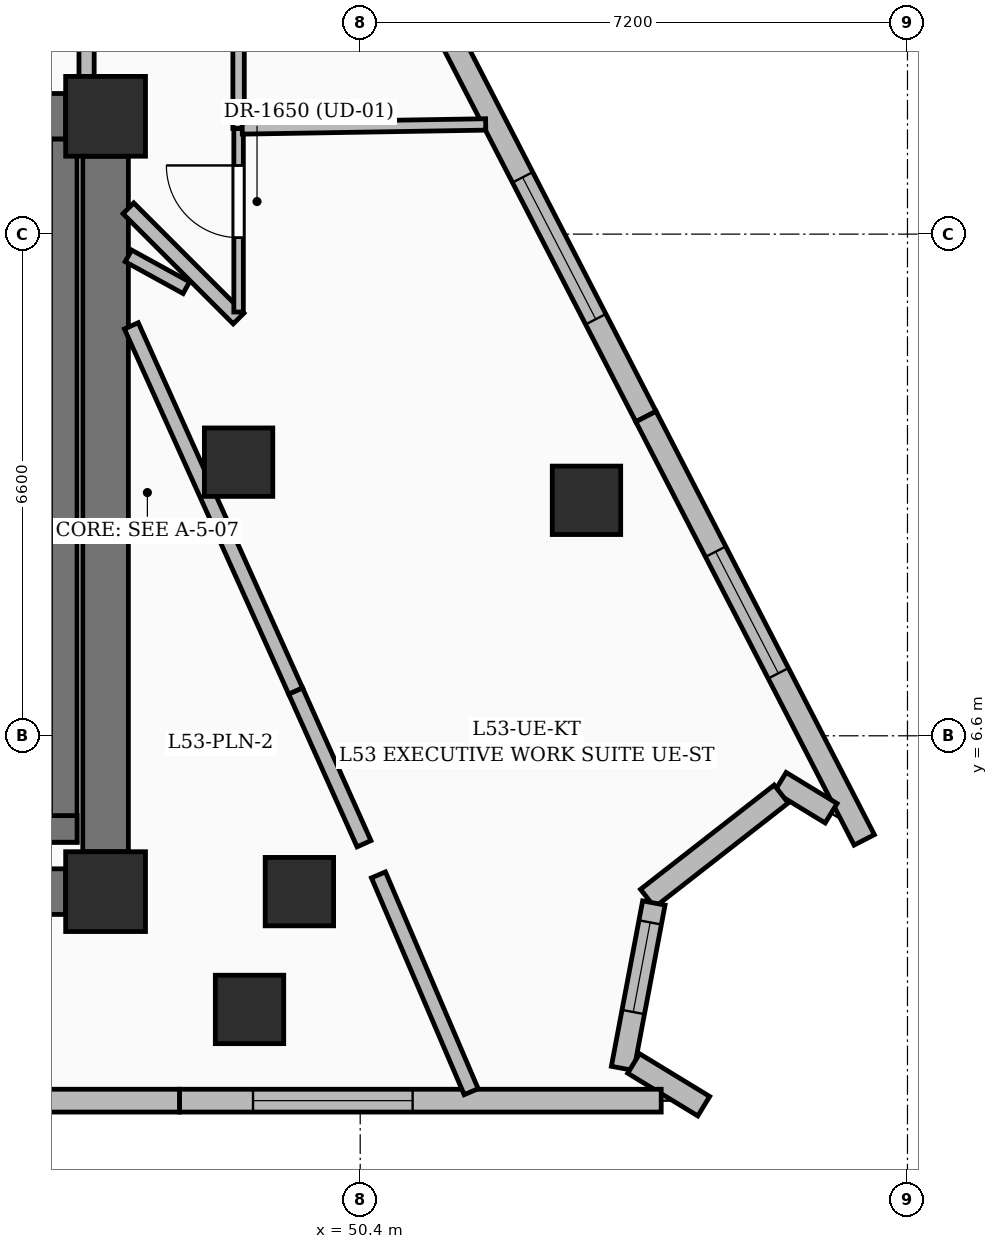
"""IFC4 building model, lengths in metres.
Left out: names, types, materials, properties, quantities, classifications, styles, units other than length and angle.
Written with IfcOpenShell. Run it as: python <this file> out.ifc"""

import sys

from ifc_helpers import new_model, si_unit, direction, frame, frame_2d, origin, origin_2d, place, context, subcontext, project, spatial, rectangle, extrude, element, fill, save


model = new_model("IFC4")
c1 = context("Model", 3, precision=1e-05, world=origin(), true_north=direction((0.0, 1.0)))
c2 = subcontext(c1, "Body", "Model", "MODEL_VIEW")
j1 = project(units=[si_unit("LENGTHUNIT", "METRE"), si_unit("PLANEANGLEUNIT", "RADIAN")], contexts=[c1])
p1 = place(None, origin())
s1 = spatial("IfcSite", under=j1, at=p1, CompositionType="ELEMENT")
p2 = place(p1, origin())
s2 = spatial("IfcBuilding", under=s1, at=p2, CompositionType="ELEMENT")
p3 = place(p2, frame((0.0, 0.0, 207.0)))
s3 = spatial("IfcBuildingStorey", under=s2, at=p3, CompositionType="ELEMENT", Elevation=207.0)
for number, where, z_axis, x_axis in (
    (1, (47.05, 4.55, 0.0), (0.0, 0.0, 1.0), (1.0, 0.0, 0.0)),
    (2, (47.05, 14.75, 0.0), (0.0, 0.0, 1.0), (1.0, 0.0, 0.0)),
):
    element("IfcColumn", number, at=place(p3, frame(where, z_axis=z_axis, x_axis=x_axis)), inside=s3, PredefinedType="COLUMN", context=c2, shape_type="SweptSolid", body=[
        extrude(rectangle(XDim=1.05, YDim=1.05, at=origin_2d()), origin(), (0.0, 0.0, 1.0), 3.75),
    ])
for number, where, z_axis, x_axis in (
    (3, (49.6, 4.55, 0.0), (0.0, 0.0, 1.0), (1.0, 0.0, 0.0)),
    (4, (48.8, 10.2, 0.0), (0.0, 0.0, 1.0), (1.0, 0.0, 0.0)),
):
    element("IfcColumn", number, at=place(p3, frame(where, z_axis=z_axis, x_axis=x_axis)), inside=s3, PredefinedType="COLUMN", context=c2, shape_type="SweptSolid", body=[
        extrude(rectangle(XDim=0.9, YDim=0.9, at=origin_2d()), origin(), (0.0, 0.0, 1.0), 3.75),
    ])
p4 = place(p3, frame((35.675, 4.55, 0.0), z_axis=(0.0, 0.0, 1.0), x_axis=(1.0, 0.0, 0.0)))
e5 = element("IfcWall", 5, at=p4, inside=s3, PredefinedType="SHEAR", context=c2, shape_type="SweptSolid", body=[
    extrude(rectangle(XDim=10.85, YDim=0.6, at=frame_2d((5.425, 0.0))), origin(), (0.0, 0.0, 1.0), 3.75),
])
p5 = place(p3, frame((35.675, 14.75, 0.0), z_axis=(0.0, 0.0, 1.0), x_axis=(1.0, 0.0, 0.0)))
e6 = element("IfcWall", 6, at=p5, inside=s3, PredefinedType="SHEAR", context=c2, shape_type="SweptSolid", body=[
    extrude(rectangle(XDim=10.85, YDim=0.6, at=frame_2d((5.425, 0.0))), origin(), (0.0, 0.0, 1.0), 3.75),
])
p6 = place(p5, frame((1.1, 0.0, 0.0)))
e7 = element("IfcOpeningElement", 7, at=p6, cuts=e6, PredefinedType="OPENING", context=c2, shape_type="SweptSolid", body=[
    extrude(rectangle(XDim=1.05, YDim=2.15, at=frame_2d((0.525, 1.075))), frame((0.0, 0.31, 0.0), z_axis=(0.0, -1.0, 0.0), x_axis=(1.0, 0.0, 0.0)), (0.0, 0.0, 1.0), 0.62),
])
p7 = place(p5, frame((8.7, 0.0, 0.0)))
e8 = element("IfcOpeningElement", 8, at=p7, cuts=e6, PredefinedType="OPENING", context=c2, shape_type="SweptSolid", body=[
    extrude(rectangle(XDim=1.05, YDim=2.15, at=frame_2d((0.525, 1.075))), frame((0.0, 0.31, 0.0), z_axis=(0.0, -1.0, 0.0), x_axis=(1.0, 0.0, 0.0)), (0.0, 0.0, 1.0), 0.62),
])
p8 = place(p5, frame((3.825, 0.0, 0.0)))
e9 = element("IfcOpeningElement", 9, at=p8, cuts=e6, PredefinedType="OPENING", context=c2, shape_type="SweptSolid", body=[
    extrude(rectangle(XDim=1.2, YDim=2.2, at=frame_2d((0.6, 1.1))), frame((0.0, 0.31, 0.0), z_axis=(0.0, -1.0, 0.0), x_axis=(1.0, 0.0, 0.0)), (0.0, 0.0, 1.0), 0.62),
])
p9 = place(p5, frame((5.825, 0.0, 0.0)))
e10 = element("IfcOpeningElement", 10, at=p9, cuts=e6, PredefinedType="OPENING", context=c2, shape_type="SweptSolid", body=[
    extrude(rectangle(XDim=1.2, YDim=2.2, at=frame_2d((0.6, 1.1))), frame((0.0, 0.31, 0.0), z_axis=(0.0, -1.0, 0.0), x_axis=(1.0, 0.0, 0.0)), (0.0, 0.0, 1.0), 0.62),
])
p10 = place(p3, frame((47.05, 5.075, 0.0), z_axis=(0.0, 0.0, 1.0), x_axis=(0.0, 1.0, 0.0)))
e11 = element("IfcWall", 11, at=p10, inside=s3, PredefinedType="SHEAR", context=c2, shape_type="SweptSolid", body=[
    extrude(rectangle(XDim=9.15, YDim=0.6, at=frame_2d((4.575, 0.0))), origin(), (0.0, 0.0, 1.0), 3.75),
])
p11 = place(p3, frame((46.5, 5.2, 0.0), z_axis=(0.0, 0.0, 1.0), x_axis=(0.0, 1.0, 0.0)))
e12 = element("IfcWall", 12, at=p11, inside=s3, PredefinedType="SOLIDWALL", context=c2, shape_type="SweptSolid", body=[
    extrude(rectangle(XDim=9.25, YDim=0.35, at=frame_2d((4.625, 0.0))), origin(), (0.0, 0.0, 1.0), 3.75),
])
p12 = place(p3, frame((43.125, 5.375, 0.0), z_axis=(0.0, 0.0, 1.0), x_axis=(1.0, 0.0, 0.0)))
e13 = element("IfcWall", 13, at=p12, inside=s3, PredefinedType="SOLIDWALL", context=c2, shape_type="SweptSolid", body=[
    extrude(rectangle(XDim=3.55, YDim=0.35, at=frame_2d((1.775, 0.0))), origin(), (0.0, 0.0, 1.0), 3.75),
])
for number, where, z_axis, x_axis in (
    (14, (48.944, 3.0, 0.0), (0.0, 0.0, 1.0), (1.0, 0.0, 0.0)),
    (15, (53.377, 9.698, 0.0), (0.0, 0.0, 1.0), (1.0, 0.0, 0.0)),
):
    element("IfcColumn", number, at=place(p3, frame(where, z_axis=z_axis, x_axis=x_axis)), inside=s3, PredefinedType="COLUMN", context=c2, shape_type="SweptSolid", body=[
        extrude(rectangle(XDim=0.9, YDim=0.9, at=origin_2d()), origin(), (0.0, 0.0, 1.0), 3.75),
    ])
p13 = place(p3, frame((51.288, 16.369, 0.0), z_axis=(0.0, 0.0, 1.0), x_axis=(0.458306446078, -0.88879424024, 0.0)))
e16 = element("IfcWall", 16, at=p13, inside=s3, PredefinedType="SOLIDWALL", context=c2, shape_type="SweptSolid", body=[
    extrude(rectangle(XDim=6.266, YDim=0.3, at=frame_2d((3.133, 0.0))), origin(), (0.0, 0.0, 1.0), 3.5),
])
p14 = place(p13, frame((2.725, 0.0, 0.55)))
e17 = element("IfcOpeningElement", 17, at=p14, cuts=e16, PredefinedType="OPENING", context=c2, shape_type="SweptSolid", body=[
    extrude(rectangle(XDim=2.1, YDim=2.4, at=frame_2d((1.05, 1.2))), frame((0.0, 0.16, 0.0), z_axis=(0.0, -1.0, 0.0), x_axis=(1.0, 0.0, 0.0)), (0.0, 0.0, 1.0), 0.32),
])
p15 = place(p3, frame((54.159, 10.8, 0.0), z_axis=(0.0, 0.0, 1.0), x_axis=(0.458322317218, -0.888786056113, 0.0)))
e18 = element("IfcWall", 18, at=p15, inside=s3, PredefinedType="SOLIDWALL", context=c2, shape_type="SweptSolid", body=[
    extrude(rectangle(XDim=6.266, YDim=0.3, at=frame_2d((3.133, 0.0))), origin(), (0.0, 0.0, 1.0), 3.5),
])
p16 = place(p15, frame((2.0, 0.0, 0.6)))
e19 = element("IfcOpeningElement", 19, at=p16, cuts=e18, PredefinedType="OPENING", context=c2, shape_type="SweptSolid", body=[
    extrude(rectangle(XDim=1.8, YDim=2.1, at=frame_2d((0.9, 1.05))), frame((0.0, 0.16, 0.0), z_axis=(0.0, -1.0, 0.0), x_axis=(1.0, 0.0, 0.0)), (0.0, 0.0, 1.0), 0.32),
])
p17 = place(p3, frame((56.595, 5.581, 0.0), z_axis=(0.0, 0.0, 1.0), x_axis=(-0.853681479387, 0.520795479772, 0.0)))
e20 = element("IfcWall", 20, at=p17, inside=s3, PredefinedType="SOLIDWALL", context=c2, shape_type="SweptSolid", body=[
    extrude(rectangle(XDim=0.785, YDim=0.3, at=frame_2d((0.392, 0.0))), origin(), (0.0, 0.0, 1.0), 3.5),
])
p18 = place(p3, frame((55.939, 5.834, 0.0), z_axis=(0.0, 0.0, 1.0), x_axis=(-0.788331324268, -0.615250943256, 0.0)))
e21 = element("IfcWall", 21, at=p18, inside=s3, PredefinedType="SOLIDWALL", context=c2, shape_type="SweptSolid", body=[
    extrude(rectangle(XDim=2.23, YDim=0.3, at=frame_2d((1.115, 0.0))), origin(), (0.0, 0.0, 1.0), 3.5),
])
p19 = place(p3, frame((54.263, 4.401, 0.0), z_axis=(0.0, 0.0, 1.0), x_axis=(-0.185632792315, -0.982619186876, 0.0)))
e22 = element("IfcWall", 22, at=p19, inside=s3, PredefinedType="SOLIDWALL", context=c2, shape_type="SweptSolid", body=[
    extrude(rectangle(XDim=2.215, YDim=0.3, at=frame_2d((1.107, 0.0))), origin(), (0.0, 0.0, 1.0), 3.5),
])
p20 = place(p19, frame((0.26, 0.0, 0.8)))
e23 = element("IfcOpeningElement", 23, at=p20, cuts=e22, PredefinedType="OPENING", context=c2, shape_type="SweptSolid", body=[
    extrude(rectangle(XDim=1.2, YDim=1.8, at=frame_2d((0.6, 0.9))), frame((0.0, 0.16, 0.0), z_axis=(0.0, -1.0, 0.0), x_axis=(1.0, 0.0, 0.0)), (0.0, 0.0, 1.0), 0.32),
])
p21 = place(p3, frame((53.998, 2.289, 0.0), z_axis=(0.0, 0.0, 1.0), x_axis=(0.853840299064, -0.520535055203, 0.0)))
e24 = element("IfcWall", 24, at=p21, inside=s3, PredefinedType="SOLIDWALL", context=c2, shape_type="SweptSolid", body=[
    extrude(rectangle(XDim=1.08, YDim=0.3, at=frame_2d((0.54, 0.0))), origin(), (0.0, 0.0, 1.0), 3.5),
])
p22 = place(p3, frame((54.36, 1.8, 0.0), z_axis=(0.0, 0.0, 1.0), x_axis=(-1.0, 0.0, 0.0)))
e25 = element("IfcWall", 25, at=p22, inside=s3, PredefinedType="SOLIDWALL", context=c2, shape_type="SweptSolid", body=[
    extrude(rectangle(XDim=6.338, YDim=0.3, at=frame_2d((3.169, 0.0))), origin(), (0.0, 0.0, 1.0), 3.5),
])
p23 = place(p22, frame((3.27, 0.0, 0.55)))
e26 = element("IfcOpeningElement", 26, at=p23, cuts=e25, PredefinedType="OPENING", context=c2, shape_type="SweptSolid", body=[
    extrude(rectangle(XDim=2.1, YDim=2.4, at=frame_2d((1.05, 1.2))), frame((0.0, 0.16, 0.0), z_axis=(0.0, -1.0, 0.0), x_axis=(1.0, 0.0, 0.0)), (0.0, 0.0, 1.0), 0.32),
])
p24 = place(p3, frame((48.022, 1.8, 0.0), z_axis=(0.0, 0.0, 1.0), x_axis=(-1.0, 0.0, 0.0)))
e27 = element("IfcWall", 27, at=p24, inside=s3, PredefinedType="SOLIDWALL", context=c2, shape_type="SweptSolid", body=[
    extrude(rectangle(XDim=6.918, YDim=0.3, at=frame_2d((3.459, 0.0))), origin(), (0.0, 0.0, 1.0), 3.5),
])
p25 = place(p24, frame((2.875, 0.0, 0.6)))
e28 = element("IfcOpeningElement", 28, at=p25, cuts=e27, PredefinedType="OPENING", context=c2, shape_type="SweptSolid", body=[
    extrude(rectangle(XDim=1.8, YDim=2.1, at=frame_2d((0.9, 1.05))), frame((0.0, 0.16, 0.0), z_axis=(0.0, -1.0, 0.0), x_axis=(1.0, 0.0, 0.0)), (0.0, 0.0, 1.0), 0.32),
])
p26 = place(p3, frame((46.8, 15.05, 0.0), z_axis=(0.0, 0.0, 1.0), x_axis=(0.0, 1.0, 0.0)))
e29 = element("IfcWall", 29, at=p26, inside=s3, PredefinedType="PARTITIONING", context=c2, shape_type="SweptSolid", body=[
    extrude(rectangle(XDim=1.7, YDim=0.2, at=frame_2d((0.85, 0.0))), origin(), (0.0, 0.0, 1.0), 2.685),
])
p27 = place(p3, frame((50.45, 5.18, 0.0), z_axis=(0.0, 0.0, 1.0), x_axis=(-0.408626143047, 0.912701854506, 0.0)))
e30 = element("IfcWall", 30, at=p27, inside=s3, PredefinedType="PARTITIONING", context=c2, shape_type="SweptSolid", body=[
    extrude(rectangle(XDim=2.202, YDim=0.2, at=frame_2d((1.101, 0.0))), origin(), (0.0, 0.0, 1.0), 2.82),
])
p28 = place(p3, frame((51.86, 1.918, 0.0), z_axis=(0.0, 0.0, 1.0), x_axis=(-0.393349316575, 0.919389098886, 0.0)))
e31 = element("IfcWall", 31, at=p28, inside=s3, PredefinedType="PARTITIONING", context=c2, shape_type="SweptSolid", body=[
    extrude(rectangle(XDim=3.102, YDim=0.2, at=frame_2d((1.551, 0.0))), origin(), (0.0, 0.0, 1.0), 3.5),
])
p29 = place(p3, frame((49.55, 7.19, 0.0), z_axis=(0.0, 0.0, 1.0), x_axis=(-0.410297221829, 0.91195185715, 0.0)))
e32 = element("IfcWall", 32, at=p29, inside=s3, PredefinedType="PARTITIONING", context=c2, shape_type="SweptSolid", body=[
    extrude(rectangle(XDim=5.267, YDim=0.2, at=frame_2d((2.634, 0.0))), origin(), (0.0, 0.0, 1.0), 2.685),
])
p30 = place(p3, frame((48.8, 12.09, 0.0), z_axis=(0.0, 0.0, 1.0), x_axis=(-0.707106781187, 0.707106781187, 0.0)))
e33 = element("IfcWall", 33, at=p30, inside=s3, PredefinedType="PARTITIONING", context=c2, shape_type="SweptSolid", body=[
    extrude(rectangle(XDim=2.051, YDim=0.2, at=frame_2d((1.025, 0.0))), origin(), (0.0, 0.0, 1.0), 3.5),
])
p31 = place(p3, frame((48.8, 12.175, 0.0), z_axis=(0.0, 0.0, 1.0), x_axis=(0.0, 1.0, 0.0)))
e34 = element("IfcWall", 34, at=p31, inside=s3, PredefinedType="PARTITIONING", context=c2, shape_type="SweptSolid", body=[
    extrude(rectangle(XDim=2.415, YDim=0.125, at=frame_2d((1.208, 0.0))), origin(), (0.0, 0.0, 1.0), 3.061),
])
p32 = place(p31, frame((0.979, 0.0, 0.0)))
e35 = element("IfcOpeningElement", 35, at=p32, cuts=e34, PredefinedType="OPENING", context=c2, shape_type="SweptSolid", body=[
    extrude(rectangle(XDim=0.95, YDim=2.2, at=frame_2d((0.475, 1.1))), frame((0.0, 0.072, 0.0), z_axis=(0.0, -1.0, 0.0), x_axis=(1.0, 0.0, 0.0)), (0.0, 0.0, 1.0), 0.145),
])
p33 = place(p3, frame((48.8, 14.59, 0.0), z_axis=(0.0, 0.0, 1.0), x_axis=(0.0, 1.0, 0.0)))
e36 = element("IfcWall", 36, at=p33, inside=s3, PredefinedType="PARTITIONING", context=c2, shape_type="SweptSolid", body=[
    extrude(rectangle(XDim=2.57, YDim=0.15, at=frame_2d((1.285, 0.0))), origin(), (0.0, 0.0, 1.0), 2.685),
])
p34 = place(p3, frame((52.051, 14.643, 0.0), z_axis=(0.0, 0.0, 1.0), x_axis=(-0.999865797865, -0.016382498593, 0.0)))
e37 = element("IfcWall", 37, at=p34, inside=s3, PredefinedType="PARTITIONING", context=c2, shape_type="SweptSolid", body=[
    extrude(rectangle(XDim=3.204, YDim=0.15, at=frame_2d((1.602, 0.0))), origin(), (0.0, 0.0, 1.0), 2.82),
])
p35 = place(p3, frame((47.35, 12.914, 0.0), z_axis=(0.0, 0.0, 1.0), x_axis=(0.876281108122, -0.481800186331, 0.0)))
e38 = element("IfcWall", 38, at=p35, inside=s3, PredefinedType="PARTITIONING", context=c2, shape_type="SweptSolid", body=[
    extrude(rectangle(XDim=0.87, YDim=0.175, at=frame_2d((0.435, 0.0))), origin(), (0.0, 0.0, 1.0), 3.5),
])
p36 = place(p14, origin())
e39 = element("IfcWindow", 39, at=p36, inside=s3, PartitioningType="SINGLE_PANEL", PredefinedType="WINDOW", context=c2, shape_type="SweptSolid", body=[
    extrude(rectangle(XDim=2.1, YDim=2.4, at=frame_2d((1.05, 1.2))), frame((0.0, 0.03, 0.0), z_axis=(0.0, -1.0, 0.0), x_axis=(1.0, 0.0, 0.0)), (0.0, 0.0, 1.0), 0.06),
])
fill(e17, e39)
p37 = place(p16, origin())
e40 = element("IfcWindow", 40, at=p37, inside=s3, PartitioningType="SINGLE_PANEL", PredefinedType="WINDOW", context=c2, shape_type="SweptSolid", body=[
    extrude(rectangle(XDim=1.8, YDim=2.1, at=frame_2d((0.9, 1.05))), frame((0.0, 0.03, 0.0), z_axis=(0.0, -1.0, 0.0), x_axis=(1.0, 0.0, 0.0)), (0.0, 0.0, 1.0), 0.06),
])
fill(e19, e40)
p38 = place(p20, origin())
e41 = element("IfcWindow", 41, at=p38, inside=s3, PartitioningType="SINGLE_PANEL", PredefinedType="WINDOW", context=c2, shape_type="SweptSolid", body=[
    extrude(rectangle(XDim=1.2, YDim=1.8, at=frame_2d((0.6, 0.9))), frame((0.0, 0.03, 0.0), z_axis=(0.0, -1.0, 0.0), x_axis=(1.0, 0.0, 0.0)), (0.0, 0.0, 1.0), 0.06),
])
fill(e23, e41)
p39 = place(p23, origin())
e42 = element("IfcWindow", 42, at=p39, inside=s3, PartitioningType="SINGLE_PANEL", PredefinedType="WINDOW", context=c2, shape_type="SweptSolid", body=[
    extrude(rectangle(XDim=2.1, YDim=2.4, at=frame_2d((1.05, 1.2))), frame((0.0, 0.03, 0.0), z_axis=(0.0, -1.0, 0.0), x_axis=(1.0, 0.0, 0.0)), (0.0, 0.0, 1.0), 0.06),
])
fill(e26, e42)
p40 = place(p32, origin())
e43 = element("IfcDoor", 43, at=p40, inside=s3, OperationType="SINGLE_SWING_RIGHT", PredefinedType="DOOR", context=c2, shape_type="SweptSolid", body=[
    extrude(rectangle(XDim=0.95, YDim=2.2, at=frame_2d((0.475, 1.1))), frame((0.0, 0.025, 0.0), z_axis=(0.0, -1.0, 0.0), x_axis=(1.0, 0.0, 0.0)), (0.0, 0.0, 1.0), 0.05),
])
fill(e35, e43)
save(model, sys.argv[1])
